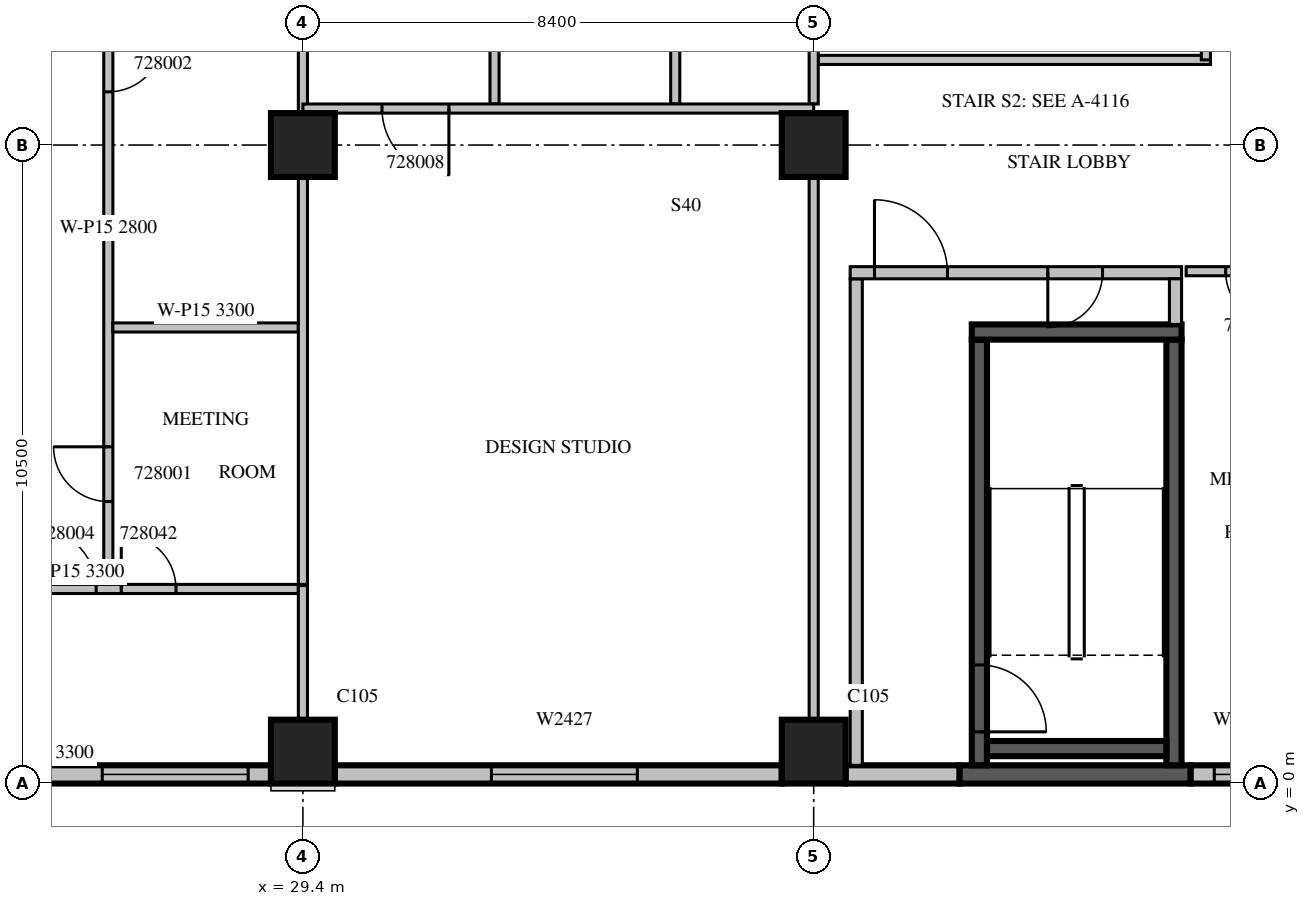
"""IFC4 building model, lengths in metres.
Left out: names, types, materials, properties, quantities, classifications, styles, units other than length and angle.
Written with IfcOpenShell. Run it as: python <this file> out.ifc"""

import sys

from ifc_helpers import new_model, si_unit, direction, frame, frame_2d, origin, origin_2d, place, context, subcontext, project, spatial, rectangle, extrude, source, transform, mapped, element, fill, save


model = new_model("IFC4")
c1 = context("Model", 3, precision=1e-05, world=origin(), true_north=direction((0.0, 1.0)))
c2 = subcontext(c1, "Body", "Model", "MODEL_VIEW")
j1 = project(units=[si_unit("LENGTHUNIT", "METRE"), si_unit("PLANEANGLEUNIT", "RADIAN")], contexts=[c1])
p1 = place(None, origin())
s1 = spatial("IfcSite", under=j1, at=p1, CompositionType="ELEMENT")
p2 = place(p1, origin())
s2 = spatial("IfcBuilding", under=s1, at=p2, CompositionType="ELEMENT")
p3 = place(p2, frame((0.0, 0.0, 128.7)))
s3 = spatial("IfcBuildingStorey", under=s2, at=p3, CompositionType="ELEMENT", Elevation=128.7)
m1 = source(origin(), c2, "Body", "SweptSolid", [
    extrude(rectangle(XDim=1.05, YDim=1.05, at=origin_2d()), origin(), (0.0, 0.0, 1.0), 4.2),
])
for number, where, z_axis, x_axis in (
    (1, (29.4, 0.525, 0.0), (0.0, 0.0, 1.0), (1.0, 0.0, 0.0)),
    (2, (37.8, 0.525, 0.0), (0.0, 0.0, 1.0), (1.0, 0.0, 0.0)),
    (3, (29.4, 10.5, 0.0), (0.0, 0.0, 1.0), (1.0, 0.0, 0.0)),
    (4, (37.8, 10.5, 0.0), (0.0, 0.0, 1.0), (1.0, 0.0, 0.0)),
):
    element("IfcColumn", number, at=place(p3, frame(where, z_axis=z_axis, x_axis=x_axis)), inside=s3, PredefinedType="COLUMN", context=c2, shape_type="MappedRepresentation", body=[
        mapped(m1, transform((0.0, 0.0, 0.0), scale=1.0)),
    ])
m2 = source(origin(), c2, "Body", "SweptSolid", [
    extrude(rectangle(XDim=7.35, YDim=0.3, at=frame_2d((3.675, 0.0))), origin(), (0.0, 0.0, 1.0), 3.3),
])
p4 = place(p3, frame((21.525, 0.15, 0.0), z_axis=(0.0, 0.0, 1.0), x_axis=(1.0, 0.0, 0.0)))
e5 = element("IfcWall", 5, at=p4, inside=s3, PredefinedType="STANDARD", context=c2, shape_type="MappedRepresentation", body=[
    mapped(m2, transform((0.0, 0.0, 0.0), scale=1.0)),
])
m3 = source(origin(), c2, "Body", "SweptSolid", [
    extrude(rectangle(XDim=2.4, YDim=2.7, at=frame_2d((1.2, 1.35))), frame((0.0, 0.16, 0.0), z_axis=(0.0, -1.0, 0.0), x_axis=(1.0, 0.0, 0.0)), (0.0, 0.0, 1.0), 0.32),
])
p5 = place(p4, frame((0.375, 0.0, 0.6)))
e6 = element("IfcOpeningElement", 6, at=p5, cuts=e5, PredefinedType="OPENING", context=c2, shape_type="MappedRepresentation", body=[
    mapped(m3, transform((0.0, 0.0, 0.0), scale=1.0)),
])
p6 = place(p4, frame((4.575, 0.0, 0.6)))
e7 = element("IfcOpeningElement", 7, at=p6, cuts=e5, PredefinedType="OPENING", context=c2, shape_type="MappedRepresentation", body=[
    mapped(m3, transform((0.0, 0.0, 0.0), scale=1.0)),
])
m4 = source(origin(), c2, "Body", "SweptSolid", [
    extrude(rectangle(XDim=7.35, YDim=0.3, at=frame_2d((3.675, 0.0))), origin(), (0.0, 0.0, 1.0), 3.8),
])
p7 = place(p3, frame((29.925, 0.15, 0.0), z_axis=(0.0, 0.0, 1.0), x_axis=(1.0, 0.0, 0.0)))
e8 = element("IfcWall", 8, at=p7, inside=s3, PredefinedType="STANDARD", context=c2, shape_type="MappedRepresentation", body=[
    mapped(m4, transform((0.0, 0.0, 0.0), scale=1.0)),
])
p8 = place(p7, frame((2.575, 0.0, 0.6)))
e9 = element("IfcOpeningElement", 9, at=p8, cuts=e8, PredefinedType="OPENING", context=c2, shape_type="MappedRepresentation", body=[
    mapped(m3, transform((0.0, 0.0, 0.0), scale=1.0)),
])
m5 = source(origin(), c2, "Body", "SweptSolid", [
    extrude(rectangle(XDim=1.875, YDim=0.3, at=frame_2d((0.938, 0.0))), origin(), (0.0, 0.0, 1.0), 3.8),
])
p9 = place(p3, frame((38.325, 0.15, 0.0), z_axis=(0.0, 0.0, 1.0), x_axis=(1.0, 0.0, 0.0)))
e10 = element("IfcWall", 10, at=p9, inside=s3, PredefinedType="STANDARD", context=c2, shape_type="MappedRepresentation", body=[
    mapped(m5, transform((0.0, 0.0, 0.0), scale=1.0)),
])
m6 = source(origin(), c2, "Body", "SweptSolid", [
    extrude(rectangle(XDim=3.8, YDim=0.3, at=frame_2d((1.9, 0.0))), origin(), (0.0, 0.0, 1.0), 3.8),
])
p10 = place(p3, frame((40.2, 0.15, 0.0), z_axis=(0.0, 0.0, 1.0), x_axis=(1.0, 0.0, 0.0)))
e11 = element("IfcWall", 11, at=p10, inside=s3, PredefinedType="SOLIDWALL", context=c2, shape_type="MappedRepresentation", body=[
    mapped(m6, transform((0.0, 0.0, 0.0), scale=1.0)),
])
m7 = source(origin(), c2, "Body", "SweptSolid", [
    extrude(rectangle(XDim=1.675, YDim=0.3, at=frame_2d((0.838, 0.0))), origin(), (0.0, 0.0, 1.0), 3.8),
])
p11 = place(p3, frame((44.0, 0.15, 0.0), z_axis=(0.0, 0.0, 1.0), x_axis=(1.0, 0.0, 0.0)))
e12 = element("IfcWall", 12, at=p11, inside=s3, PredefinedType="STANDARD", context=c2, shape_type="MappedRepresentation", body=[
    mapped(m7, transform((0.0, 0.0, 0.0), scale=1.0)),
])
m8 = source(origin(), c2, "Body", "SweptSolid", [
    extrude(rectangle(XDim=0.9, YDim=2.7, at=frame_2d((0.45, 1.35))), frame((0.0, 0.16, 0.0), z_axis=(0.0, -1.0, 0.0), x_axis=(1.0, 0.0, 0.0)), (0.0, 0.0, 1.0), 0.32),
])
p12 = place(p11, frame((0.388, 0.0, 0.6)))
e13 = element("IfcOpeningElement", 13, at=p12, cuts=e12, PredefinedType="OPENING", context=c2, shape_type="MappedRepresentation", body=[
    mapped(m8, transform((0.0, 0.0, 0.0), scale=1.0)),
])
m9 = source(origin(), c2, "Body", "SweptSolid", [
    extrude(rectangle(XDim=7.0, YDim=0.25, at=frame_2d((3.5, 0.0))), origin(), (0.0, 0.0, 1.0), 3.8),
])
p13 = place(p3, frame((40.525, 0.3, 0.0), z_axis=(0.0, 0.0, 1.0), x_axis=(0.0, 1.0, 0.0)))
e14 = element("IfcWall", 14, at=p13, inside=s3, PredefinedType="SOLIDWALL", context=c2, shape_type="MappedRepresentation", body=[
    mapped(m9, transform((0.0, 0.0, 0.0), scale=1.0)),
])
m10 = source(origin(), c2, "Body", "SweptSolid", [
    extrude(rectangle(XDim=1.1, YDim=2.1, at=frame_2d((0.55, 1.05))), frame((0.0, 0.135, 0.0), z_axis=(0.0, -1.0, 0.0), x_axis=(1.0, 0.0, 0.0)), (0.0, 0.0, 1.0), 0.27),
])
p14 = place(p13, frame((0.55, 0.0, 0.0)))
e15 = element("IfcOpeningElement", 15, at=p14, cuts=e14, PredefinedType="OPENING", context=c2, shape_type="MappedRepresentation", body=[
    mapped(m10, transform((0.0, 0.0, 0.0), scale=1.0)),
])
p15 = place(p3, frame((43.725, 0.3, 0.0), z_axis=(0.0, 0.0, 1.0), x_axis=(0.0, 1.0, 0.0)))
e16 = element("IfcWall", 16, at=p15, inside=s3, PredefinedType="SOLIDWALL", context=c2, shape_type="MappedRepresentation", body=[
    mapped(m9, transform((0.0, 0.0, 0.0), scale=1.0)),
])
m11 = source(origin(), c2, "Body", "SweptSolid", [
    extrude(rectangle(XDim=3.45, YDim=0.25, at=frame_2d((1.725, 0.0))), origin(), (0.0, 0.0, 1.0), 3.8),
])
p16 = place(p3, frame((40.4, 7.425, 0.0), z_axis=(0.0, 0.0, 1.0), x_axis=(1.0, 0.0, 0.0)))
e17 = element("IfcWall", 17, at=p16, inside=s3, PredefinedType="SOLIDWALL", context=c2, shape_type="MappedRepresentation", body=[
    mapped(m11, transform((0.0, 0.0, 0.0), scale=1.0)),
])
m12 = source(origin(), c2, "Body", "SweptSolid", [
    extrude(rectangle(XDim=2.95, YDim=0.25, at=frame_2d((1.475, 0.0))), origin(), (0.0, 0.0, 1.0), 3.8),
])
p17 = place(p3, frame((40.65, 0.575, 0.0), z_axis=(0.0, 0.0, 1.0), x_axis=(1.0, 0.0, 0.0)))
e18 = element("IfcWall", 18, at=p17, inside=s3, PredefinedType="SOLIDWALL", context=c2, shape_type="MappedRepresentation", body=[
    mapped(m12, transform((0.0, 0.0, 0.0), scale=1.0)),
])
m13 = source(origin(), c2, "Body", "SweptSolid", [
    extrude(rectangle(XDim=8.0, YDim=0.2, at=frame_2d((4.0, 0.0))), origin(), (0.0, 0.0, 1.0), 3.8),
])
p18 = place(p3, frame((38.5, 0.3, 0.0), z_axis=(0.0, 0.0, 1.0), x_axis=(0.0, 1.0, 0.0)))
e19 = element("IfcWall", 19, at=p18, inside=s3, PredefinedType="PARTITIONING", context=c2, shape_type="MappedRepresentation", body=[
    mapped(m13, transform((0.0, 0.0, 0.0), scale=1.0)),
])
m14 = source(origin(), c2, "Body", "SweptSolid", [
    extrude(rectangle(XDim=5.45, YDim=0.2, at=frame_2d((2.725, 0.0))), origin(), (0.0, 0.0, 1.0), 3.8),
])
p19 = place(p3, frame((38.4, 8.4, 0.0), z_axis=(0.0, 0.0, 1.0), x_axis=(1.0, 0.0, 0.0)))
e20 = element("IfcWall", 20, at=p19, inside=s3, PredefinedType="PARTITIONING", context=c2, shape_type="MappedRepresentation", body=[
    mapped(m14, transform((0.0, 0.0, 0.0), scale=1.0)),
])
m15 = source(origin(), c2, "Body", "SweptSolid", [
    extrude(rectangle(XDim=1.2, YDim=2.1, at=frame_2d((0.6, 1.05))), frame((0.0, 0.11, 0.0), z_axis=(0.0, -1.0, 0.0), x_axis=(1.0, 0.0, 0.0)), (0.0, 0.0, 1.0), 0.22),
])
p20 = place(p19, frame((0.4, 0.0, 0.0)))
e21 = element("IfcOpeningElement", 21, at=p20, cuts=e20, PredefinedType="OPENING", context=c2, shape_type="MappedRepresentation", body=[
    mapped(m15, transform((0.0, 0.0, 0.0), scale=1.0)),
])
m16 = source(origin(), c2, "Body", "SweptSolid", [
    extrude(rectangle(XDim=0.9, YDim=2.1, at=frame_2d((0.45, 1.05))), frame((0.0, 0.11, 0.0), z_axis=(0.0, -1.0, 0.0), x_axis=(1.0, 0.0, 0.0)), (0.0, 0.0, 1.0), 0.22),
])
p21 = place(p19, frame((3.25, 0.0, 0.0)))
e22 = element("IfcOpeningElement", 22, at=p21, cuts=e20, PredefinedType="OPENING", context=c2, shape_type="MappedRepresentation", body=[
    mapped(m16, transform((0.0, 0.0, 0.0), scale=1.0)),
])
m17 = source(origin(), c2, "Body", "SweptSolid", [
    extrude(rectangle(XDim=0.75, YDim=0.2, at=frame_2d((0.375, 0.0))), origin(), (0.0, 0.0, 1.0), 3.8),
])
p22 = place(p3, frame((43.75, 7.55, 0.0), z_axis=(0.0, 0.0, 1.0), x_axis=(0.0, 1.0, 0.0)))
e23 = element("IfcWall", 23, at=p22, inside=s3, PredefinedType="PARTITIONING", context=c2, shape_type="MappedRepresentation", body=[
    mapped(m17, transform((0.0, 0.0, 0.0), scale=1.0)),
])
p23 = place(p3, frame((26.2, 15.0, 0.0), z_axis=(0.0, 0.0, 1.0), x_axis=(0.0, -1.0, 0.0)))
e24 = element("IfcWall", 24, at=p23, inside=s3, PredefinedType="PARTITIONING", context=c2, shape_type="SweptSolid", body=[
    extrude(rectangle(XDim=11.725, YDim=0.15, at=frame_2d((5.862, 0.0))), origin(), (0.0, 0.0, 1.0), 2.8),
])
m18 = source(origin(), c2, "Body", "SweptSolid", [
    extrude(rectangle(XDim=0.9, YDim=2.1, at=frame_2d((0.45, 1.05))), frame((0.0, 0.085, 0.0), z_axis=(0.0, -1.0, 0.0), x_axis=(1.0, 0.0, 0.0)), (0.0, 0.0, 1.0), 0.17),
])
p24 = place(p23, frame((9.463, 0.0, 0.0)))
e25 = element("IfcOpeningElement", 25, at=p24, cuts=e24, PredefinedType="OPENING", context=c2, shape_type="MappedRepresentation", body=[
    mapped(m18, transform((0.0, 0.0, 0.0), scale=1.0)),
])
p25 = place(p23, frame((2.725, 0.0, 0.0)))
e26 = element("IfcOpeningElement", 26, at=p25, cuts=e24, PredefinedType="OPENING", context=c2, shape_type="MappedRepresentation", body=[
    mapped(m18, transform((0.0, 0.0, 0.0), scale=1.0)),
])
p26 = place(p3, frame((29.325, 7.5, 0.0), z_axis=(0.0, 0.0, 1.0), x_axis=(-1.0, 0.0, 0.0)))
e27 = element("IfcWall", 27, at=p26, inside=s3, PredefinedType="PARTITIONING", context=c2, shape_type="SweptSolid", body=[
    extrude(rectangle(XDim=3.05, YDim=0.15, at=frame_2d((1.525, 0.0))), origin(), (0.0, 0.0, 1.0), 3.3),
])
m19 = source(origin(), c2, "Body", "SweptSolid", [
    extrude(rectangle(XDim=6.701, YDim=0.15, at=frame_2d((3.35, 0.0))), origin(), (0.0, 0.0, 1.0), 3.8),
])
p27 = place(p3, frame((29.4, 3.275, 0.0), z_axis=(0.0, 0.0, 1.0), x_axis=(0.0, 1.0, 0.0)))
e28 = element("IfcWall", 28, at=p27, inside=s3, PredefinedType="PARTITIONING", context=c2, shape_type="MappedRepresentation", body=[
    mapped(m19, transform((0.0, 0.0, 0.0), scale=1.0)),
])
m20 = source(origin(), c2, "Body", "SweptSolid", [
    extrude(rectangle(XDim=3.976, YDim=0.15, at=frame_2d((1.988, 0.0))), origin(), (0.0, 0.0, 1.0), 3.8),
])
p28 = place(p3, frame((29.4, 11.024, 0.0), z_axis=(0.0, 0.0, 1.0), x_axis=(0.0, 1.0, 0.0)))
e29 = element("IfcWall", 29, at=p28, inside=s3, PredefinedType="PARTITIONING", context=c2, shape_type="MappedRepresentation", body=[
    mapped(m20, transform((0.0, 0.0, 0.0), scale=1.0)),
])
m21 = source(origin(), c2, "Body", "SweptSolid", [
    extrude(rectangle(XDim=7.325, YDim=0.15, at=frame_2d((3.663, 0.0))), origin(), (0.0, 0.0, 1.0), 3.3),
])
p29 = place(p3, frame((22.0, 3.2, 0.0), z_axis=(0.0, 0.0, 1.0), x_axis=(1.0, 0.0, 0.0)))
e30 = element("IfcWall", 30, at=p29, inside=s3, PredefinedType="PARTITIONING", context=c2, shape_type="MappedRepresentation", body=[
    mapped(m21, transform((0.0, 0.0, 0.0), scale=1.0)),
])
m22 = source(origin(), c2, "Body", "SweptSolid", [
    extrude(rectangle(XDim=1.0, YDim=2.1, at=frame_2d((0.5, 1.05))), frame((0.0, 0.085, 0.0), z_axis=(0.0, -1.0, 0.0), x_axis=(1.0, 0.0, 0.0)), (0.0, 0.0, 1.0), 0.17),
])
p30 = place(p29, frame((3.0, 0.0, 0.0)))
e31 = element("IfcOpeningElement", 31, at=p30, cuts=e30, PredefinedType="OPENING", context=c2, shape_type="MappedRepresentation", body=[
    mapped(m22, transform((0.0, 0.0, 0.0), scale=1.0)),
])
p31 = place(p29, frame((4.413, 0.0, 0.0)))
e32 = element("IfcOpeningElement", 32, at=p31, cuts=e30, PredefinedType="OPENING", context=c2, shape_type="MappedRepresentation", body=[
    mapped(m18, transform((0.0, 0.0, 0.0), scale=1.0)),
])
m23 = source(origin(), c2, "Body", "SweptSolid", [
    extrude(rectangle(XDim=6.45, YDim=0.15, at=frame_2d((3.225, 0.0))), origin(), (0.0, 0.0, 1.0), 3.8),
])
p32 = place(p3, frame((37.875, 11.9, 0.0), z_axis=(0.0, 0.0, 1.0), x_axis=(1.0, 0.0, 0.0)))
e33 = element("IfcWall", 33, at=p32, inside=s3, PredefinedType="PARTITIONING", context=c2, shape_type="MappedRepresentation", body=[
    mapped(m23, transform((0.0, 0.0, 0.0), scale=1.0)),
])
m24 = source(origin(), c2, "Body", "SweptSolid", [
    extrude(rectangle(XDim=3.175, YDim=0.15, at=frame_2d((1.587, 0.0))), origin(), (0.0, 0.0, 1.0), 3.8),
])
p33 = place(p3, frame((44.25, 11.9, 0.0), z_axis=(0.0, 0.0, 1.0), x_axis=(0.0, 1.0, 0.0)))
e34 = element("IfcWall", 34, at=p33, inside=s3, PredefinedType="PARTITIONING", context=c2, shape_type="MappedRepresentation", body=[
    mapped(m24, transform((0.0, 0.0, 0.0), scale=1.0)),
])
m25 = source(origin(), c2, "Body", "SweptSolid", [
    extrude(rectangle(XDim=2.2, YDim=0.15, at=frame_2d((1.1, 0.0))), origin(), (0.0, 0.0, 1.0), 3.8),
])
p34 = place(p3, frame((46.125, 8.425, 0.0), z_axis=(0.0, 0.0, 1.0), x_axis=(-1.0, 0.0, 0.0)))
e35 = element("IfcWall", 35, at=p34, inside=s3, PredefinedType="PARTITIONING", context=c2, shape_type="MappedRepresentation", body=[
    mapped(m25, transform((0.0, 0.0, 0.0), scale=1.0)),
])
p35 = place(p34, frame((0.65, 0.0, 0.0)))
e36 = element("IfcOpeningElement", 36, at=p35, cuts=e35, PredefinedType="OPENING", context=c2, shape_type="MappedRepresentation", body=[
    mapped(m18, transform((0.0, 0.0, 0.0), scale=1.0)),
])
m26 = source(origin(), c2, "Body", "SweptSolid", [
    extrude(rectangle(XDim=3.825, YDim=0.15, at=frame_2d((1.913, 0.0))), origin(), (0.0, 0.0, 1.0), 3.8),
])
for number, where, z_axis, x_axis in (
    (37, (32.551, 11.175, 0.0), (0.0, 0.0, 1.0), (0.0, 1.0, 0.0)),
    (38, (35.523, 11.175, 0.0), (0.0, 0.0, 1.0), (0.0, 1.0, 0.0)),
):
    element("IfcWall", number, at=place(p3, frame(where, z_axis=z_axis, x_axis=x_axis)), inside=s3, PredefinedType="PARTITIONING", context=c2, shape_type="MappedRepresentation", body=[
        mapped(m26, transform((0.0, 0.0, 0.0), scale=1.0)),
    ])
m27 = source(origin(), c2, "Body", "SweptSolid", [
    extrude(rectangle(XDim=2.206, YDim=0.15, at=frame_2d((1.103, 0.0))), origin(), (0.0, 0.0, 1.0), 3.8),
])
p36 = place(p3, frame((29.4, 1.049, 0.0), z_axis=(0.0, 0.0, 1.0), x_axis=(0.0, 1.0, 0.0)))
e39 = element("IfcWall", 39, at=p36, inside=s3, PredefinedType="PARTITIONING", context=c2, shape_type="MappedRepresentation", body=[
    mapped(m27, transform((0.0, 0.0, 0.0), scale=1.0)),
])
m28 = source(origin(), c2, "Body", "SweptSolid", [
    extrude(rectangle(XDim=8.927, YDim=0.15, at=frame_2d((4.463, 0.0))), origin(), (0.0, 0.0, 1.0), 3.8),
])
p37 = place(p3, frame((37.8, 1.049, 0.0), z_axis=(0.0, 0.0, 1.0), x_axis=(0.0, 1.0, 0.0)))
e40 = element("IfcWall", 40, at=p37, inside=s3, PredefinedType="PARTITIONING", context=c2, shape_type="MappedRepresentation", body=[
    mapped(m28, transform((0.0, 0.0, 0.0), scale=1.0)),
])
p38 = place(p3, frame((37.8, 11.175, 0.0), z_axis=(0.0, 0.0, 1.0), x_axis=(0.0, 1.0, 0.0)))
e41 = element("IfcWall", 41, at=p38, inside=s3, PredefinedType="PARTITIONING", context=c2, shape_type="MappedRepresentation", body=[
    mapped(m26, transform((0.0, 0.0, 0.0), scale=1.0)),
])
m29 = source(origin(), c2, "Body", "SweptSolid", [
    extrude(rectangle(XDim=8.4, YDim=0.15, at=frame_2d((4.2, 0.0))), origin(), (0.0, 0.0, 1.0), 3.8),
])
p39 = place(p3, frame((37.8, 11.1, 0.0), z_axis=(0.0, 0.0, 1.0), x_axis=(-1.0, 0.0, 0.0)))
e42 = element("IfcWall", 42, at=p39, inside=s3, PredefinedType="PARTITIONING", context=c2, shape_type="MappedRepresentation", body=[
    mapped(m29, transform((0.0, 0.0, 0.0), scale=1.0)),
])
m30 = source(origin(), c2, "Body", "SweptSolid", [
    extrude(rectangle(XDim=1.1, YDim=2.1, at=frame_2d((0.55, 1.05))), frame((0.0, 0.085, 0.0), z_axis=(0.0, -1.0, 0.0), x_axis=(1.0, 0.0, 0.0)), (0.0, 0.0, 1.0), 0.17),
])
p40 = place(p39, frame((5.999, 0.0, 0.0)))
e43 = element("IfcOpeningElement", 43, at=p40, cuts=e42, PredefinedType="OPENING", context=c2, shape_type="MappedRepresentation", body=[
    mapped(m30, transform((0.0, 0.0, 0.0), scale=1.0)),
])
m31 = source(origin(), c2, "Body", "SweptSolid", [
    extrude(rectangle(XDim=2.4, YDim=2.7, at=frame_2d((1.2, 1.35))), frame((0.0, 0.03, 0.0), z_axis=(0.0, -1.0, 0.0), x_axis=(1.0, 0.0, 0.0)), (0.0, 0.0, 1.0), 0.06),
])
p41 = place(p6, origin())
e44 = element("IfcWindow", 44, at=p41, inside=s3, PartitioningType="SINGLE_PANEL", PredefinedType="WINDOW", context=c2, shape_type="MappedRepresentation", body=[
    mapped(m31, transform((0.0, 0.0, 0.0), scale=1.0)),
])
fill(e7, e44)
p42 = place(p8, origin())
e45 = element("IfcWindow", 45, at=p42, inside=s3, PartitioningType="SINGLE_PANEL", PredefinedType="WINDOW", context=c2, shape_type="MappedRepresentation", body=[
    mapped(m31, transform((0.0, 0.0, 0.0), scale=1.0)),
])
fill(e9, e45)
m32 = source(origin(), c2, "Body", "SweptSolid", [
    extrude(rectangle(XDim=0.9, YDim=2.7, at=frame_2d((0.45, 1.35))), frame((0.0, 0.03, 0.0), z_axis=(0.0, -1.0, 0.0), x_axis=(1.0, 0.0, 0.0)), (0.0, 0.0, 1.0), 0.06),
])
p43 = place(p12, origin())
e46 = element("IfcWindow", 46, at=p43, inside=s3, PartitioningType="SINGLE_PANEL", PredefinedType="WINDOW", context=c2, shape_type="MappedRepresentation", body=[
    mapped(m32, transform((0.0, 0.0, 0.0), scale=1.0)),
])
fill(e13, e46)
m33 = source(origin(), c2, "Body", "SweptSolid", [
    extrude(rectangle(XDim=1.1, YDim=2.1, at=frame_2d((0.55, 1.05))), frame((0.0, 0.025, 0.0), z_axis=(0.0, -1.0, 0.0), x_axis=(1.0, 0.0, 0.0)), (0.0, 0.0, 1.0), 0.05),
])
p44 = place(p14, origin())
e47 = element("IfcDoor", 47, at=p44, inside=s3, OperationType="SINGLE_SWING_RIGHT", PredefinedType="DOOR", context=c2, shape_type="MappedRepresentation", body=[
    mapped(m33, transform((0.0, 0.0, 0.0), scale=1.0)),
])
fill(e15, e47)
m34 = source(origin(), c2, "Body", "SweptSolid", [
    extrude(rectangle(XDim=1.2, YDim=2.1, at=frame_2d((0.6, 1.05))), frame((0.0, 0.025, 0.0), z_axis=(0.0, -1.0, 0.0), x_axis=(1.0, 0.0, 0.0)), (0.0, 0.0, 1.0), 0.05),
])
p45 = place(p20, origin())
e48 = element("IfcDoor", 48, at=p45, inside=s3, OperationType="SINGLE_SWING_LEFT", PredefinedType="DOOR", context=c2, shape_type="MappedRepresentation", body=[
    mapped(m34, transform((0.0, 0.0, 0.0), scale=1.0)),
])
fill(e21, e48)
m35 = source(origin(), c2, "Body", "SweptSolid", [
    extrude(rectangle(XDim=0.9, YDim=2.1, at=frame_2d((0.45, 1.05))), frame((0.0, 0.025, 0.0), z_axis=(0.0, -1.0, 0.0), x_axis=(1.0, 0.0, 0.0)), (0.0, 0.0, 1.0), 0.05),
])
p46 = place(p21, origin())
e49 = element("IfcDoor", 49, at=p46, inside=s3, OperationType="SINGLE_SWING_RIGHT", PredefinedType="DOOR", context=c2, shape_type="MappedRepresentation", body=[
    mapped(m35, transform((0.0, 0.0, 0.0), scale=1.0)),
])
fill(e22, e49)
p47 = place(p24, origin())
e50 = element("IfcDoor", 50, at=p47, inside=s3, OperationType="SINGLE_SWING_RIGHT", PredefinedType="DOOR", context=c2, shape_type="MappedRepresentation", body=[
    mapped(m35, transform((0.0, 0.0, 0.0), scale=1.0)),
])
fill(e25, e50)
p48 = place(p25, origin())
e51 = element("IfcDoor", 51, at=p48, inside=s3, OperationType="SINGLE_SWING_LEFT", PredefinedType="DOOR", context=c2, shape_type="MappedRepresentation", body=[
    mapped(m35, transform((0.0, 0.0, 0.0), scale=1.0)),
])
fill(e26, e51)
m36 = source(origin(), c2, "Body", "SweptSolid", [
    extrude(rectangle(XDim=1.0, YDim=2.1, at=frame_2d((0.5, 1.05))), frame((0.0, 0.025, 0.0), z_axis=(0.0, -1.0, 0.0), x_axis=(1.0, 0.0, 0.0)), (0.0, 0.0, 1.0), 0.05),
])
p49 = place(p30, origin())
e52 = element("IfcDoor", 52, at=p49, inside=s3, OperationType="SINGLE_SWING_LEFT", PredefinedType="DOOR", context=c2, shape_type="MappedRepresentation", body=[
    mapped(m36, transform((0.0, 0.0, 0.0), scale=1.0)),
])
fill(e31, e52)
p50 = place(p35, origin())
e53 = element("IfcDoor", 53, at=p50, inside=s3, OperationType="SINGLE_SWING_LEFT", PredefinedType="DOOR", context=c2, shape_type="MappedRepresentation", body=[
    mapped(m35, transform((0.0, 0.0, 0.0), scale=1.0)),
])
fill(e36, e53)
p51 = place(p40, origin())
e54 = element("IfcDoor", 54, at=p51, inside=s3, OperationType="SINGLE_SWING_LEFT", PredefinedType="DOOR", context=c2, shape_type="MappedRepresentation", body=[
    mapped(m33, transform((0.0, 0.0, 0.0), scale=1.0)),
])
fill(e43, e54)
p52 = place(p31, origin())
e55 = element("IfcDoor", 55, at=p52, inside=s3, OperationType="SINGLE_SWING_LEFT", PredefinedType="DOOR", context=c2, shape_type="MappedRepresentation", body=[
    mapped(m35, transform((0.0, 0.0, 0.0), scale=1.0)),
])
fill(e32, e55)
save(model, sys.argv[1])
